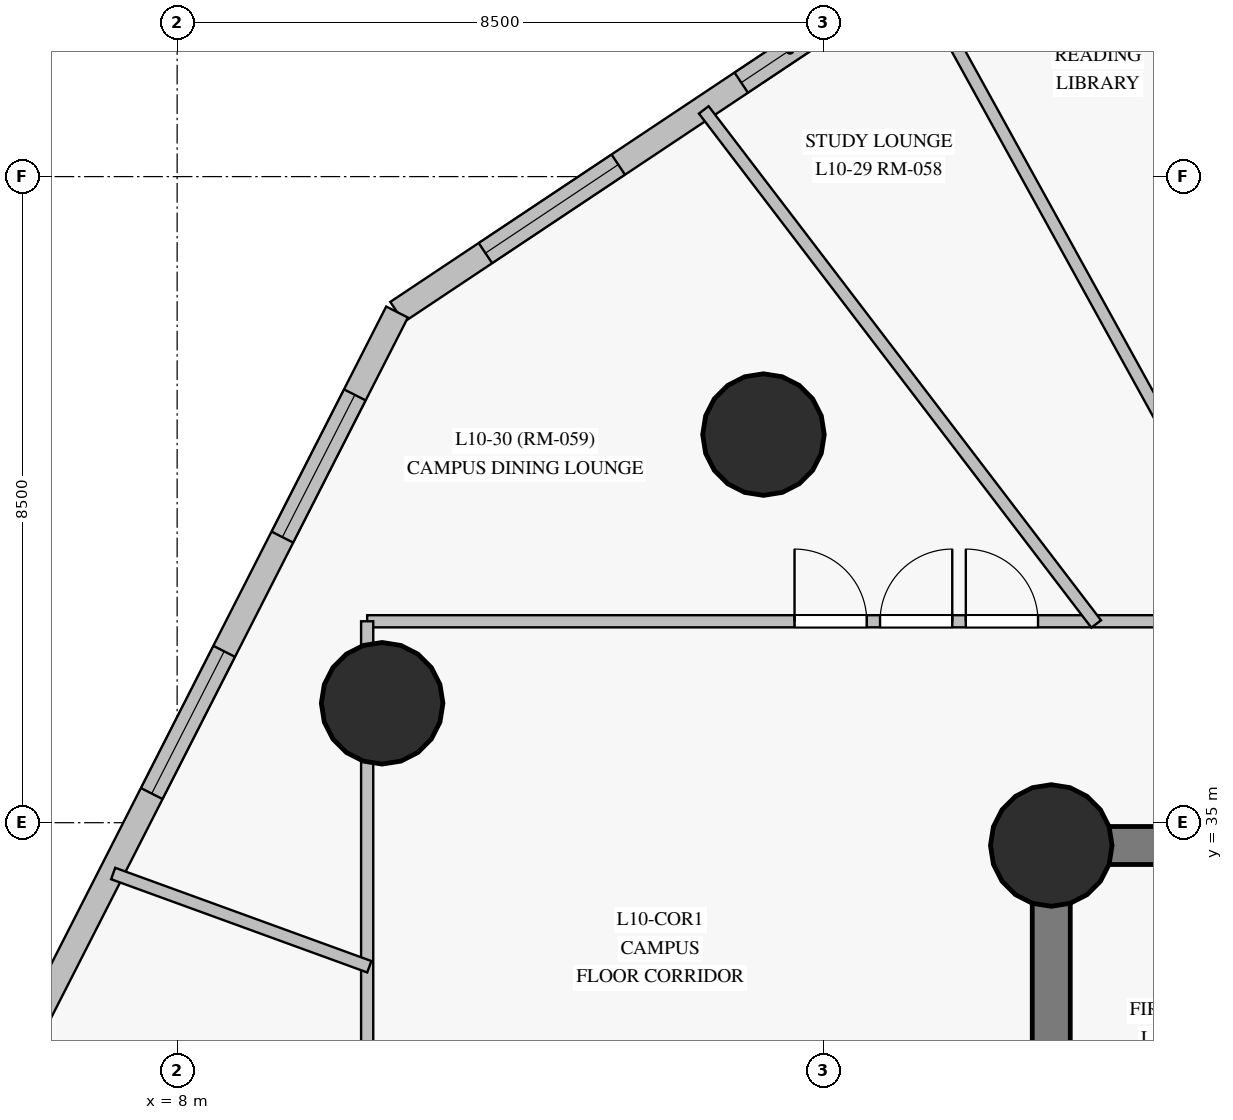
"""IFC4 building model, lengths in metres.
Left out: names, types, materials, properties, quantities, classifications, styles, units other than length and angle.
Written with IfcOpenShell. Run it as: python <this file> out.ifc"""

import sys

from ifc_helpers import new_model, si_unit, direction, frame, frame_2d, origin, origin_with_axes, origin_2d, place, context, subcontext, project, spatial, rectangle, circle, extrude, source, transform, mapped, element, fill, save


model = new_model("IFC4")
c1 = context("Model", 3, precision=1e-05, world=origin(), true_north=direction((0.0, 1.0)))
c2 = subcontext(c1, "Body", "Model", "MODEL_VIEW")
j1 = project(units=[si_unit("LENGTHUNIT", "METRE"), si_unit("PLANEANGLEUNIT", "RADIAN")], contexts=[c1])
p1 = place(None, origin())
s1 = spatial("IfcSite", under=j1, at=p1, CompositionType="ELEMENT")
p2 = place(p1, origin())
s2 = spatial("IfcBuilding", under=s1, at=p2, CompositionType="ELEMENT")
p3 = place(p2, frame((0.0, 0.0, 40.9)))
s3 = spatial("IfcBuildingStorey", under=s2, at=p3, CompositionType="ELEMENT", Elevation=40.9)
p4 = place(p3, frame((26.55, 34.7, 0.0), z_axis=(0.0, 0.0, 1.0), x_axis=(-1.0, 0.0, 0.0)))
e1 = element("IfcWall", 1, at=p4, inside=s3, PredefinedType="SHEAR", context=c2, shape_type="SweptSolid", body=[
    extrude(rectangle(XDim=7.05, YDim=0.5, at=frame_2d((3.525, 0.0))), origin(), (0.0, 0.0, 1.0), 3.35),
])
p5 = place(p4, frame((4.25, 0.0, 0.0)))
e2 = element("IfcOpeningElement", 2, at=p5, cuts=e1, PredefinedType="OPENING", context=c2, shape_type="SweptSolid", body=[
    extrude(rectangle(XDim=1.1, YDim=2.15, at=frame_2d((0.55, 1.075))), frame((0.0, 0.26, 0.0), z_axis=(0.0, -1.0, 0.0), x_axis=(1.0, 0.0, 0.0)), (0.0, 0.0, 1.0), 0.52),
])
p6 = place(p3, frame((19.5, 34.7, 0.0), z_axis=(0.0, 0.0, 1.0), x_axis=(0.0, -1.0, 0.0)))
e3 = element("IfcWall", 3, at=p6, inside=s3, PredefinedType="SHEAR", context=c2, shape_type="SweptSolid", body=[
    extrude(rectangle(XDim=16.4, YDim=0.5, at=frame_2d((8.2, 0.0))), origin(), (0.0, 0.0, 1.0), 3.35),
])
p7 = place(p6, frame((3.1, 0.0, 0.0)))
e4 = element("IfcOpeningElement", 4, at=p7, cuts=e3, PredefinedType="OPENING", context=c2, shape_type="SweptSolid", body=[
    extrude(rectangle(XDim=1.1, YDim=2.15, at=frame_2d((0.55, 1.075))), frame((0.0, 0.26, 0.0), z_axis=(0.0, -1.0, 0.0), x_axis=(1.0, 0.0, 0.0)), (0.0, 0.0, 1.0), 0.52),
])
m1 = source(origin_with_axes(), c2, "Body", "SweptSolid", [
    extrude(circle(Radius=0.8, at=origin_2d()), origin(), (0.0, 0.0, 1.0), 3.6),
])
for number, where, z_axis, x_axis in (
    (5, (19.5, 34.7, 0.0), (0.0, 0.0, 1.0), (1.0, 0.0, 0.0)),
    (6, (15.714, 40.106, 0.0), (0.0, 0.0, 1.0), (1.0, 0.0, 0.0)),
    (7, (10.697, 36.571, 0.0), (0.0, 0.0, 1.0), (1.0, 0.0, 0.0)),
):
    element("IfcColumn", number, at=place(p3, frame(where, z_axis=z_axis, x_axis=x_axis)), inside=s3, PredefinedType="COLUMN", context=c2, shape_type="MappedRepresentation", body=[
        mapped(m1, transform((0.0, 0.0, 0.0), scale=1.0)),
    ])
p8 = place(p3, frame((21.232, 48.608, 0.0), z_axis=(0.0, 0.0, 1.0), x_axis=(-0.832150043839, -0.554550542816, 0.0)))
e8 = element("IfcWall", 8, at=p8, inside=s3, PredefinedType="SOLIDWALL", context=c2, shape_type="SweptSolid", body=[
    extrude(rectangle(XDim=12.424, YDim=0.32, at=frame_2d((6.212, 0.0))), origin(), (0.0, 0.0, 1.0), 3.35),
])
p9 = place(p8, frame((1.196, 0.0, 0.85)))
e9 = element("IfcOpeningElement", 9, at=p9, cuts=e8, PredefinedType="OPENING", context=c2, shape_type="SweptSolid", body=[
    extrude(rectangle(XDim=2.1, YDim=1.95, at=frame_2d((1.05, 0.975))), frame((0.0, 0.17, 0.0), z_axis=(0.0, -1.0, 0.0), x_axis=(1.0, 0.0, 0.0)), (0.0, 0.0, 1.0), 0.34),
])
p10 = place(p8, frame((4.882, 0.0, 0.85)))
e10 = element("IfcOpeningElement", 10, at=p10, cuts=e8, PredefinedType="OPENING", context=c2, shape_type="SweptSolid", body=[
    extrude(rectangle(XDim=2.1, YDim=1.95, at=frame_2d((1.05, 0.975))), frame((0.0, 0.17, 0.0), z_axis=(0.0, -1.0, 0.0), x_axis=(1.0, 0.0, 0.0)), (0.0, 0.0, 1.0), 0.34),
])
p11 = place(p8, frame((8.927, 0.0, 0.85)))
e11 = element("IfcOpeningElement", 11, at=p11, cuts=e8, PredefinedType="OPENING", context=c2, shape_type="SweptSolid", body=[
    extrude(rectangle(XDim=2.1, YDim=1.95, at=frame_2d((1.05, 0.975))), frame((0.0, 0.17, 0.0), z_axis=(0.0, -1.0, 0.0), x_axis=(1.0, 0.0, 0.0)), (0.0, 0.0, 1.0), 0.34),
])
p12 = place(p3, frame((10.893, 41.719, 0.0), z_axis=(0.0, 0.0, 1.0), x_axis=(-0.453939025407, -0.891032749798, 0.0)))
e12 = element("IfcWall", 12, at=p12, inside=s3, PredefinedType="SOLIDWALL", context=c2, shape_type="SweptSolid", body=[
    extrude(rectangle(XDim=15.464, YDim=0.32, at=frame_2d((7.732, 0.0))), origin(), (0.0, 0.0, 1.0), 3.35),
])
p13 = place(p12, frame((1.223, 0.0, 0.85)))
e13 = element("IfcOpeningElement", 13, at=p13, cuts=e12, PredefinedType="OPENING", context=c2, shape_type="SweptSolid", body=[
    extrude(rectangle(XDim=2.1, YDim=1.95, at=frame_2d((1.05, 0.975))), frame((0.0, 0.17, 0.0), z_axis=(0.0, -1.0, 0.0), x_axis=(1.0, 0.0, 0.0)), (0.0, 0.0, 1.0), 0.34),
])
p14 = place(p12, frame((5.01, 0.0, 0.85)))
e14 = element("IfcOpeningElement", 14, at=p14, cuts=e12, PredefinedType="OPENING", context=c2, shape_type="SweptSolid", body=[
    extrude(rectangle(XDim=2.1, YDim=1.95, at=frame_2d((1.05, 0.975))), frame((0.0, 0.17, 0.0), z_axis=(0.0, -1.0, 0.0), x_axis=(1.0, 0.0, 0.0)), (0.0, 0.0, 1.0), 0.34),
])
p15 = place(p12, frame((10.607, 0.0, 0.85)))
e15 = element("IfcOpeningElement", 15, at=p15, cuts=e12, PredefinedType="OPENING", context=c2, shape_type="SweptSolid", body=[
    extrude(rectangle(XDim=2.1, YDim=1.95, at=frame_2d((1.05, 0.975))), frame((0.0, 0.17, 0.0), z_axis=(0.0, -1.0, 0.0), x_axis=(1.0, 0.0, 0.0)), (0.0, 0.0, 1.0), 0.34),
])
p16 = place(p3, frame((10.5, 37.65, 0.0), z_axis=(0.0, 0.0, 1.0), x_axis=(1.0, 0.0, 0.0)))
e16 = element("IfcWall", 16, at=p16, inside=s3, PredefinedType="PARTITIONING", context=c2, shape_type="SweptSolid", body=[
    extrude(rectangle(XDim=29.75, YDim=0.16, at=frame_2d((14.875, 0.0))), origin(), (0.0, 0.0, 1.0), 2.75),
])
p17 = place(p16, frame((27.998, 0.0, 0.0)))
e17 = element("IfcOpeningElement", 17, at=p17, cuts=e16, PredefinedType="OPENING", context=c2, shape_type="SweptSolid", body=[
    extrude(rectangle(XDim=0.95, YDim=2.15, at=frame_2d((0.475, 1.075))), frame((0.0, 0.09, 0.0), z_axis=(0.0, -1.0, 0.0), x_axis=(1.0, 0.0, 0.0)), (0.0, 0.0, 1.0), 0.18),
])
p18 = place(p16, frame((25.599, 0.0, 0.0)))
e18 = element("IfcOpeningElement", 18, at=p18, cuts=e16, PredefinedType="OPENING", context=c2, shape_type="SweptSolid", body=[
    extrude(rectangle(XDim=0.95, YDim=2.15, at=frame_2d((0.475, 1.075))), frame((0.0, 0.09, 0.0), z_axis=(0.0, -1.0, 0.0), x_axis=(1.0, 0.0, 0.0)), (0.0, 0.0, 1.0), 0.18),
])
p19 = place(p16, frame((23.319, 0.0, 0.0)))
e19 = element("IfcOpeningElement", 19, at=p19, cuts=e16, PredefinedType="OPENING", context=c2, shape_type="SweptSolid", body=[
    extrude(rectangle(XDim=0.95, YDim=2.15, at=frame_2d((0.475, 1.075))), frame((0.0, 0.09, 0.0), z_axis=(0.0, -1.0, 0.0), x_axis=(1.0, 0.0, 0.0)), (0.0, 0.0, 1.0), 0.18),
])
p20 = place(p16, frame((20.597, 0.0, 0.0)))
e20 = element("IfcOpeningElement", 20, at=p20, cuts=e16, PredefinedType="OPENING", context=c2, shape_type="SweptSolid", body=[
    extrude(rectangle(XDim=0.95, YDim=2.15, at=frame_2d((0.475, 1.075))), frame((0.0, 0.09, 0.0), z_axis=(0.0, -1.0, 0.0), x_axis=(1.0, 0.0, 0.0)), (0.0, 0.0, 1.0), 0.18),
])
p21 = place(p16, frame((18.611, 0.0, 0.0)))
e21 = element("IfcOpeningElement", 21, at=p21, cuts=e16, PredefinedType="OPENING", context=c2, shape_type="SweptSolid", body=[
    extrude(rectangle(XDim=0.95, YDim=2.15, at=frame_2d((0.475, 1.075))), frame((0.0, 0.09, 0.0), z_axis=(0.0, -1.0, 0.0), x_axis=(1.0, 0.0, 0.0)), (0.0, 0.0, 1.0), 0.18),
])
p22 = place(p16, frame((16.123, 0.0, 0.0)))
e22 = element("IfcOpeningElement", 22, at=p22, cuts=e16, PredefinedType="OPENING", context=c2, shape_type="SweptSolid", body=[
    extrude(rectangle(XDim=0.95, YDim=2.15, at=frame_2d((0.475, 1.075))), frame((0.0, 0.09, 0.0), z_axis=(0.0, -1.0, 0.0), x_axis=(1.0, 0.0, 0.0)), (0.0, 0.0, 1.0), 0.18),
])
p23 = place(p16, frame((12.996, 0.0, 0.0)))
e23 = element("IfcOpeningElement", 23, at=p23, cuts=e16, PredefinedType="OPENING", context=c2, shape_type="SweptSolid", body=[
    extrude(rectangle(XDim=0.95, YDim=2.15, at=frame_2d((0.475, 1.075))), frame((0.0, 0.09, 0.0), z_axis=(0.0, -1.0, 0.0), x_axis=(1.0, 0.0, 0.0)), (0.0, 0.0, 1.0), 0.18),
])
p24 = place(p16, frame((10.46, 0.0, 0.0)))
e24 = element("IfcOpeningElement", 24, at=p24, cuts=e16, PredefinedType="OPENING", context=c2, shape_type="SweptSolid", body=[
    extrude(rectangle(XDim=0.95, YDim=2.15, at=frame_2d((0.475, 1.075))), frame((0.0, 0.09, 0.0), z_axis=(0.0, -1.0, 0.0), x_axis=(1.0, 0.0, 0.0)), (0.0, 0.0, 1.0), 0.18),
])
p25 = place(p16, frame((7.876, 0.0, 0.0)))
e25 = element("IfcOpeningElement", 25, at=p25, cuts=e16, PredefinedType="OPENING", context=c2, shape_type="SweptSolid", body=[
    extrude(rectangle(XDim=0.95, YDim=2.15, at=frame_2d((0.475, 1.075))), frame((0.0, 0.09, 0.0), z_axis=(0.0, -1.0, 0.0), x_axis=(1.0, 0.0, 0.0)), (0.0, 0.0, 1.0), 0.18),
])
p26 = place(p16, frame((6.748, 0.0, 0.0)))
e26 = element("IfcOpeningElement", 26, at=p26, cuts=e16, PredefinedType="OPENING", context=c2, shape_type="SweptSolid", body=[
    extrude(rectangle(XDim=0.95, YDim=2.15, at=frame_2d((0.475, 1.075))), frame((0.0, 0.09, 0.0), z_axis=(0.0, -1.0, 0.0), x_axis=(1.0, 0.0, 0.0)), (0.0, 0.0, 1.0), 0.18),
])
p27 = place(p16, frame((5.623, 0.0, 0.0)))
e27 = element("IfcOpeningElement", 27, at=p27, cuts=e16, PredefinedType="OPENING", context=c2, shape_type="SweptSolid", body=[
    extrude(rectangle(XDim=0.95, YDim=2.15, at=frame_2d((0.475, 1.075))), frame((0.0, 0.09, 0.0), z_axis=(0.0, -1.0, 0.0), x_axis=(1.0, 0.0, 0.0)), (0.0, 0.0, 1.0), 0.18),
])
p28 = place(p3, frame((10.5, 15.35, 0.0), z_axis=(0.0, 0.0, 1.0), x_axis=(0.0, 1.0, 0.0)))
e28 = element("IfcWall", 28, at=p28, inside=s3, PredefinedType="PARTITIONING", context=c2, shape_type="SweptSolid", body=[
    extrude(rectangle(XDim=22.3, YDim=0.16, at=frame_2d((11.15, 0.0))), origin(), (0.0, 0.0, 1.0), 2.75),
])
p29 = place(p28, frame((10.675, 0.0, 0.0)))
e29 = element("IfcOpeningElement", 29, at=p29, cuts=e28, PredefinedType="OPENING", context=c2, shape_type="SweptSolid", body=[
    extrude(rectangle(XDim=0.95, YDim=2.15, at=frame_2d((0.475, 1.075))), frame((0.0, 0.09, 0.0), z_axis=(0.0, -1.0, 0.0), x_axis=(1.0, 0.0, 0.0)), (0.0, 0.0, 1.0), 0.18),
])
p30 = place(p28, frame((5.54, 0.0, 0.0)))
e30 = element("IfcOpeningElement", 30, at=p30, cuts=e28, PredefinedType="OPENING", context=c2, shape_type="SweptSolid", body=[
    extrude(rectangle(XDim=0.96, YDim=2.15, at=frame_2d((0.48, 1.075))), frame((0.0, 0.09, 0.0), z_axis=(0.0, -1.0, 0.0), x_axis=(1.0, 0.0, 0.0)), (0.0, 0.0, 1.0), 0.18),
])
p31 = place(p28, frame((2.055, 0.0, 0.0)))
e31 = element("IfcOpeningElement", 31, at=p31, cuts=e28, PredefinedType="OPENING", context=c2, shape_type="SweptSolid", body=[
    extrude(rectangle(XDim=0.95, YDim=2.15, at=frame_2d((0.475, 1.075))), frame((0.0, 0.09, 0.0), z_axis=(0.0, -1.0, 0.0), x_axis=(1.0, 0.0, 0.0)), (0.0, 0.0, 1.0), 0.18),
])
p32 = place(p28, frame((14.02, 0.0, 0.0)))
e32 = element("IfcOpeningElement", 32, at=p32, cuts=e28, PredefinedType="OPENING", context=c2, shape_type="SweptSolid", body=[
    extrude(rectangle(XDim=0.95, YDim=2.15, at=frame_2d((0.475, 1.075))), frame((0.0, 0.09, 0.0), z_axis=(0.0, -1.0, 0.0), x_axis=(1.0, 0.0, 0.0)), (0.0, 0.0, 1.0), 0.18),
])
p33 = place(p3, frame((22.432, 37.624, 0.0), z_axis=(0.0, 0.0, 1.0), x_axis=(-0.483043149999, 0.875596548211, 0.0)))
e33 = element("IfcWall", 33, at=p33, inside=s3, PredefinedType="PARTITIONING", context=c2, shape_type="SweptSolid", body=[
    extrude(rectangle(XDim=9.815, YDim=0.16, at=frame_2d((4.908, 0.0))), origin(), (0.0, 0.0, 1.0), 3.35),
])
p34 = place(p3, frame((20.091, 37.614, 0.0), z_axis=(0.0, 0.0, 1.0), x_axis=(-0.606768271493, 0.794878773593, 0.0)))
e34 = element("IfcWall", 34, at=p34, inside=s3, PredefinedType="PARTITIONING", context=c2, shape_type="SweptSolid", body=[
    extrude(rectangle(XDim=8.509, YDim=0.16, at=frame_2d((4.254, 0.0))), origin(), (0.0, 0.0, 1.0), 3.35),
])
p35 = place(p3, frame((10.528, 33.105, 0.0), z_axis=(0.0, 0.0, 1.0), x_axis=(-0.939697983434, 0.342005409213, 0.0)))
e35 = element("IfcWall", 35, at=p35, inside=s3, PredefinedType="PARTITIONING", context=c2, shape_type="SweptSolid", body=[
    extrude(rectangle(XDim=3.586, YDim=0.16, at=frame_2d((1.793, 0.0))), origin(), (0.0, 0.0, 1.0), 3.35),
])
m2 = source(origin_with_axes(), c2, "Body", "SweptSolid", [
    extrude(rectangle(XDim=2.1, YDim=1.95, at=frame_2d((1.05, 0.975))), frame((0.0, 0.03, 0.0), z_axis=(0.0, -1.0, 0.0), x_axis=(1.0, 0.0, 0.0)), (0.0, 0.0, 1.0), 0.06),
])
p36 = place(p10, origin())
e36 = element("IfcWindow", 36, at=p36, inside=s3, PartitioningType="SINGLE_PANEL", PredefinedType="WINDOW", context=c2, shape_type="MappedRepresentation", body=[
    mapped(m2, transform((0.0, 0.0, 0.0), scale=1.0)),
])
fill(e10, e36)
p37 = place(p11, origin())
e37 = element("IfcWindow", 37, at=p37, inside=s3, PartitioningType="SINGLE_PANEL", PredefinedType="WINDOW", context=c2, shape_type="MappedRepresentation", body=[
    mapped(m2, transform((0.0, 0.0, 0.0), scale=1.0)),
])
fill(e11, e37)
p38 = place(p13, origin())
e38 = element("IfcWindow", 38, at=p38, inside=s3, PartitioningType="SINGLE_PANEL", PredefinedType="WINDOW", context=c2, shape_type="MappedRepresentation", body=[
    mapped(m2, transform((0.0, 0.0, 0.0), scale=1.0)),
])
fill(e13, e38)
p39 = place(p14, origin())
e39 = element("IfcWindow", 39, at=p39, inside=s3, PartitioningType="SINGLE_PANEL", PredefinedType="WINDOW", context=c2, shape_type="MappedRepresentation", body=[
    mapped(m2, transform((0.0, 0.0, 0.0), scale=1.0)),
])
fill(e14, e39)
m3 = source(origin_with_axes(), c2, "Body", "SweptSolid", [
    extrude(rectangle(XDim=0.95, YDim=2.15, at=frame_2d((0.475, 1.075))), frame((0.0, 0.025, 0.0), z_axis=(0.0, -1.0, 0.0), x_axis=(1.0, 0.0, 0.0)), (0.0, 0.0, 1.0), 0.05),
])
p40 = place(p25, origin())
e40 = element("IfcDoor", 40, at=p40, inside=s3, OperationType="SINGLE_SWING_LEFT", PredefinedType="DOOR", context=c2, shape_type="MappedRepresentation", body=[
    mapped(m3, transform((0.0, 0.0, 0.0), scale=1.0)),
])
fill(e25, e40)
p41 = place(p26, origin())
e41 = element("IfcDoor", 41, at=p41, inside=s3, OperationType="SINGLE_SWING_RIGHT", PredefinedType="DOOR", context=c2, shape_type="MappedRepresentation", body=[
    mapped(m3, transform((0.0, 0.0, 0.0), scale=1.0)),
])
fill(e26, e41)
p42 = place(p27, origin())
e42 = element("IfcDoor", 42, at=p42, inside=s3, OperationType="SINGLE_SWING_LEFT", PredefinedType="DOOR", context=c2, shape_type="MappedRepresentation", body=[
    mapped(m3, transform((0.0, 0.0, 0.0), scale=1.0)),
])
fill(e27, e42)
save(model, sys.argv[1])
